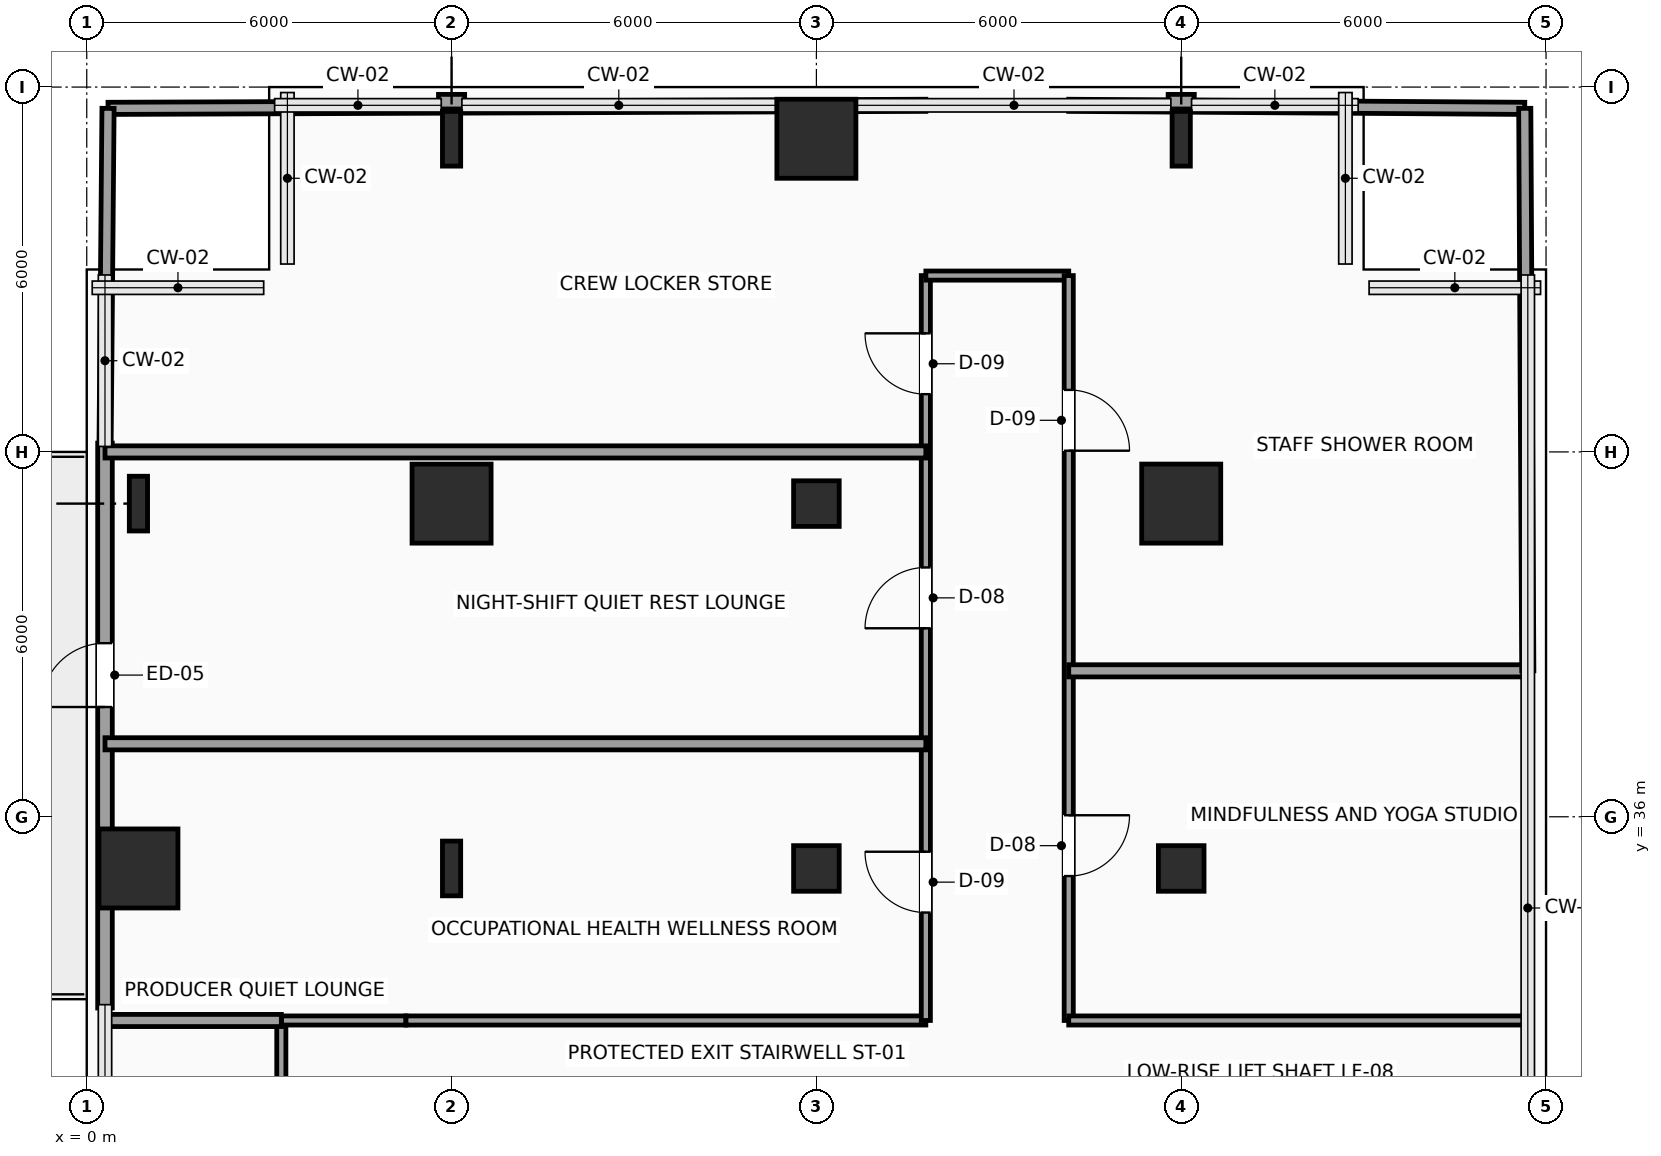
"""IFC4 building model, lengths in metres.
Left out: names, types, materials, properties, quantities, classifications, styles, units other than length and angle.
Written with IfcOpenShell. Run it as: python <this file> out.ifc"""

import sys

from ifc_helpers import new_model, si_unit, direction, frame, frame_2d, origin, origin_2d, place, context, subcontext, project, spatial, rectangle, hollow_rectangle, i_section, extrude, element, fill, save


model = new_model("IFC4")
c1 = context("Model", 3, precision=1e-05, world=origin(), true_north=direction((0.0, 1.0)))
c2 = subcontext(c1, "Body", "Model", "MODEL_VIEW")
j1 = project(units=[si_unit("LENGTHUNIT", "METRE"), si_unit("PLANEANGLEUNIT", "RADIAN")], contexts=[c1])
p1 = place(None, origin())
s1 = spatial("IfcSite", under=j1, at=p1, CompositionType="ELEMENT")
p2 = place(p1, origin())
s2 = spatial("IfcBuilding", under=s1, at=p2, CompositionType="ELEMENT")
p3 = place(p2, frame((0.0, 0.0, 71.4)))
s3 = spatial("IfcBuildingStorey", under=s2, at=p3, CompositionType="ELEMENT", Elevation=71.4)
p4 = place(p3, frame((0.85, 35.15, 0.0), z_axis=(0.0, 0.0, 1.0), x_axis=(1.0, 0.0, 0.0)))
e1 = element("IfcColumn", 1, at=p4, inside=s3, PredefinedType="COLUMN", context=c2, shape_type="SweptSolid", body=[
    extrude(rectangle(XDim=1.3, YDim=1.3, at=origin_2d()), origin(), (0.0, 0.0, 1.0), 3.9),
])
for number, where, z_axis, x_axis in (
    (2, (0.85, 41.15, 0.0), (0.0, 0.0, 1.0), (1.0, 0.0, 0.0)),
    (3, (6.0, 35.15, 0.0), (0.0, 0.0, 1.0), (1.0, 0.0, 0.0)),
):
    element("IfcColumn", number, at=place(p3, frame(where, z_axis=z_axis, x_axis=x_axis)), inside=s3, PredefinedType="COLUMN", context=c2, shape_type="SweptSolid", body=[
        extrude(i_section(OverallWidth=0.3, OverallDepth=0.9, WebThickness=0.019, FlangeThickness=0.035, FilletRadius=0.03, at=origin_2d()), origin(), (0.0, 0.0, 1.0), 3.9),
    ])
p5 = place(p3, frame((6.0, 41.15, 0.0), z_axis=(0.0, 0.0, 1.0), x_axis=(1.0, 0.0, 0.0)))
e4 = element("IfcColumn", 4, at=p5, inside=s3, PredefinedType="COLUMN", context=c2, shape_type="SweptSolid", body=[
    extrude(rectangle(XDim=1.3, YDim=1.3, at=origin_2d()), origin(), (0.0, 0.0, 1.0), 3.9),
])
p6 = place(p3, frame((6.0, 47.15, 0.0), z_axis=(0.0, 0.0, 1.0), x_axis=(1.0, 0.0, 0.0)))
e5 = element("IfcColumn", 5, at=p6, inside=s3, PredefinedType="COLUMN", context=c2, shape_type="SweptSolid", body=[
    extrude(i_section(OverallWidth=0.3, OverallDepth=0.9, WebThickness=0.019, FlangeThickness=0.035, FilletRadius=0.03, at=origin_2d()), origin(), (0.0, 0.0, 1.0), 3.9),
])
for number, where, z_axis, x_axis in (
    (6, (12.0, 35.15, 0.0), (0.0, 0.0, 1.0), (1.0, 0.0, 0.0)),
    (7, (12.0, 41.15, 0.0), (0.0, 0.0, 1.0), (1.0, 0.0, 0.0)),
):
    element("IfcColumn", number, at=place(p3, frame(where, z_axis=z_axis, x_axis=x_axis)), inside=s3, PredefinedType="COLUMN", context=c2, shape_type="SweptSolid", body=[
        extrude(hollow_rectangle(XDim=0.75, YDim=0.75, WallThickness=0.035, InnerFilletRadius=0.035, OuterFilletRadius=0.05, at=origin_2d()), origin(), (0.0, 0.0, 1.0), 3.9),
    ])
p7 = place(p3, frame((12.0, 47.15, 0.0), z_axis=(0.0, 0.0, 1.0), x_axis=(1.0, 0.0, 0.0)))
e8 = element("IfcColumn", 8, at=p7, inside=s3, PredefinedType="COLUMN", context=c2, shape_type="SweptSolid", body=[
    extrude(rectangle(XDim=1.3, YDim=1.3, at=origin_2d()), origin(), (0.0, 0.0, 1.0), 3.9),
])
p8 = place(p3, frame((18.0, 35.15, 0.0), z_axis=(0.0, 0.0, 1.0), x_axis=(1.0, 0.0, 0.0)))
e9 = element("IfcColumn", 9, at=p8, inside=s3, PredefinedType="COLUMN", context=c2, shape_type="SweptSolid", body=[
    extrude(hollow_rectangle(XDim=0.75, YDim=0.75, WallThickness=0.035, InnerFilletRadius=0.035, OuterFilletRadius=0.05, at=origin_2d()), origin(), (0.0, 0.0, 1.0), 3.9),
])
p9 = place(p3, frame((18.0, 41.15, 0.0), z_axis=(0.0, 0.0, 1.0), x_axis=(1.0, 0.0, 0.0)))
e10 = element("IfcColumn", 10, at=p9, inside=s3, PredefinedType="COLUMN", context=c2, shape_type="SweptSolid", body=[
    extrude(rectangle(XDim=1.3, YDim=1.3, at=origin_2d()), origin(), (0.0, 0.0, 1.0), 3.9),
])
p10 = place(p3, frame((18.0, 47.15, 0.0), z_axis=(0.0, 0.0, 1.0), x_axis=(1.0, 0.0, 0.0)))
e11 = element("IfcColumn", 11, at=p10, inside=s3, PredefinedType="COLUMN", context=c2, shape_type="SweptSolid", body=[
    extrude(i_section(OverallWidth=0.3, OverallDepth=0.9, WebThickness=0.019, FlangeThickness=0.035, FilletRadius=0.03, at=origin_2d()), origin(), (0.0, 0.0, 1.0), 3.9),
])
p11 = place(p3, frame((0.3, 32.855, 0.0), z_axis=(0.0, 0.0, 1.0), x_axis=(0.0, 1.0, 0.0)))
e12 = element("IfcWall", 12, at=p11, inside=s3, PredefinedType="SOLIDWALL", context=c2, shape_type="SweptSolid", body=[
    extrude(rectangle(XDim=9.29, YDim=0.24, at=frame_2d((4.645, 0.0))), origin(), (0.0, 0.0, 1.0), 3.65),
])
p12 = place(p11, frame((4.95, 0.0, 0.0)))
e13 = element("IfcOpeningElement", 13, at=p12, cuts=e12, PredefinedType="OPENING", context=c2, shape_type="SweptSolid", body=[
    extrude(rectangle(XDim=1.05, YDim=2.2, at=frame_2d((0.525, 1.1))), frame((0.0, 0.13, 0.0), z_axis=(0.0, -1.0, 0.0), x_axis=(1.0, 0.0, 0.0)), (0.0, 0.0, 1.0), 0.26),
])
for number, where, z_axis, x_axis in (
    (14, (5.785, 47.76, 0.0), (0.0, 0.0, 1.0), (1.0, 0.0, 0.0)),
    (15, (17.785, 47.76, 0.0), (0.0, 0.0, 1.0), (1.0, 0.0, 0.0)),
):
    element("IfcWall", number, at=place(p3, frame(where, z_axis=z_axis, x_axis=x_axis)), inside=s3, PredefinedType="SOLIDWALL", context=c2, shape_type="SweptSolid", body=[
        extrude(rectangle(XDim=0.43, YDim=0.24, at=frame_2d((0.215, 0.0))), origin(), (0.0, 0.0, 1.0), 3.65),
    ])
p13 = place(p3, frame((3.2, 30.25, 0.0), z_axis=(0.0, 0.0, 1.0), x_axis=(0.0, 1.0, 0.0)))
e16 = element("IfcWall", 16, at=p13, inside=s3, PredefinedType="PARTITIONING", context=c2, shape_type="SweptSolid", body=[
    extrude(rectangle(XDim=2.4, YDim=0.15, at=frame_2d((1.2, 0.0))), origin(), (0.0, 0.0, 1.0), 3.65),
])
p14 = place(p3, frame((3.2, 32.65, 0.0), z_axis=(0.0, 0.0, 1.0), x_axis=(1.0, 0.0, 0.0)))
e17 = element("IfcWall", 17, at=p14, inside=s3, PredefinedType="PARTITIONING", context=c2, shape_type="SweptSolid", body=[
    extrude(rectangle(XDim=2.05, YDim=0.15, at=frame_2d((1.025, 0.0))), origin(), (0.0, 0.0, 1.0), 3.65),
])
p15 = place(p3, frame((5.25, 32.65, 0.0), z_axis=(0.0, 0.0, 1.0), x_axis=(1.0, 0.0, 0.0)))
e18 = element("IfcWall", 18, at=p15, inside=s3, PredefinedType="PARTITIONING", context=c2, shape_type="SweptSolid", body=[
    extrude(rectangle(XDim=8.55, YDim=0.15, at=frame_2d((4.275, 0.0))), origin(), (0.0, 0.0, 1.0), 3.65),
])
p16 = place(p3, frame((13.8, 32.65, 0.0), z_axis=(0.0, 0.0, 1.0), x_axis=(0.0, 1.0, 0.0)))
e19 = element("IfcWall", 19, at=p16, inside=s3, PredefinedType="PARTITIONING", context=c2, shape_type="SweptSolid", body=[
    extrude(rectangle(XDim=12.25, YDim=0.15, at=frame_2d((6.125, 0.0))), origin(), (0.0, 0.0, 1.0), 3.65),
])
p17 = place(p16, frame((1.775, 0.0, 0.0)))
e20 = element("IfcOpeningElement", 20, at=p17, cuts=e19, PredefinedType="OPENING", context=c2, shape_type="SweptSolid", body=[
    extrude(rectangle(XDim=1.0, YDim=2.2, at=frame_2d((0.5, 1.1))), frame((0.0, 0.085, 0.0), z_axis=(0.0, -1.0, 0.0), x_axis=(1.0, 0.0, 0.0)), (0.0, 0.0, 1.0), 0.17),
])
p18 = place(p16, frame((6.45, 0.0, 0.0)))
e21 = element("IfcOpeningElement", 21, at=p18, cuts=e19, PredefinedType="OPENING", context=c2, shape_type="SweptSolid", body=[
    extrude(rectangle(XDim=1.0, YDim=2.2, at=frame_2d((0.5, 1.1))), frame((0.0, 0.085, 0.0), z_axis=(0.0, -1.0, 0.0), x_axis=(1.0, 0.0, 0.0)), (0.0, 0.0, 1.0), 0.17),
])
p19 = place(p16, frame((10.3, 0.0, 0.0)))
e22 = element("IfcOpeningElement", 22, at=p19, cuts=e19, PredefinedType="OPENING", context=c2, shape_type="SweptSolid", body=[
    extrude(rectangle(XDim=1.0, YDim=2.2, at=frame_2d((0.5, 1.1))), frame((0.0, 0.085, 0.0), z_axis=(0.0, -1.0, 0.0), x_axis=(1.0, 0.0, 0.0)), (0.0, 0.0, 1.0), 0.17),
])
p20 = place(p3, frame((13.8, 44.9, 0.0), z_axis=(0.0, 0.0, 1.0), x_axis=(1.0, 0.0, 0.0)))
e23 = element("IfcWall", 23, at=p20, inside=s3, PredefinedType="PARTITIONING", context=c2, shape_type="SweptSolid", body=[
    extrude(rectangle(XDim=2.35, YDim=0.15, at=frame_2d((1.175, 0.0))), origin(), (0.0, 0.0, 1.0), 3.65),
])
p21 = place(p3, frame((16.15, 44.9, 0.0), z_axis=(0.0, 0.0, 1.0), x_axis=(0.0, -1.0, 0.0)))
e24 = element("IfcWall", 24, at=p21, inside=s3, PredefinedType="PARTITIONING", context=c2, shape_type="SweptSolid", body=[
    extrude(rectangle(XDim=12.25, YDim=0.15, at=frame_2d((6.125, 0.0))), origin(), (0.0, 0.0, 1.0), 3.65),
])
p22 = place(p21, frame((8.875, 0.0, 0.0)))
e25 = element("IfcOpeningElement", 25, at=p22, cuts=e24, PredefinedType="OPENING", context=c2, shape_type="SweptSolid", body=[
    extrude(rectangle(XDim=1.0, YDim=2.2, at=frame_2d((0.5, 1.1))), frame((0.0, 0.085, 0.0), z_axis=(0.0, -1.0, 0.0), x_axis=(1.0, 0.0, 0.0)), (0.0, 0.0, 1.0), 0.17),
])
p23 = place(p21, frame((1.88, 0.0, 0.0)))
e26 = element("IfcOpeningElement", 26, at=p23, cuts=e24, PredefinedType="OPENING", context=c2, shape_type="SweptSolid", body=[
    extrude(rectangle(XDim=1.0, YDim=2.2, at=frame_2d((0.5, 1.1))), frame((0.0, 0.085, 0.0), z_axis=(0.0, -1.0, 0.0), x_axis=(1.0, 0.0, 0.0)), (0.0, 0.0, 1.0), 0.17),
])
p24 = place(p3, frame((16.15, 32.65, 0.0), z_axis=(0.0, 0.0, 1.0), x_axis=(1.0, 0.0, 0.0)))
e27 = element("IfcWall", 27, at=p24, inside=s3, PredefinedType="PARTITIONING", context=c2, shape_type="SweptSolid", body=[
    extrude(rectangle(XDim=7.55, YDim=0.15, at=frame_2d((3.775, 0.0))), origin(), (0.0, 0.0, 1.0), 3.65),
])
for number, where, z_axis, x_axis in (
    (28, (0.3, 37.2, 0.0), (0.0, 0.0, 1.0), (1.0, 0.0, 0.0)),
    (29, (0.3, 42.0, 0.0), (0.0, 0.0, 1.0), (1.0, 0.0, 0.0)),
):
    element("IfcWall", number, at=place(p3, frame(where, z_axis=z_axis, x_axis=x_axis)), inside=s3, PredefinedType="PARTITIONING", context=c2, shape_type="SweptSolid", body=[
        extrude(rectangle(XDim=13.5, YDim=0.2, at=frame_2d((6.75, 0.0))), origin(), (0.0, 0.0, 1.0), 3.65),
    ])
p25 = place(p3, frame((0.35, 47.65, 0.0), z_axis=(0.0, 0.0, 1.0), x_axis=(0.99999304924, 0.003728467862, 0.0)))
e30 = element("IfcWall", 30, at=p25, inside=s3, PredefinedType="PARTITIONING", context=c2, shape_type="SweptSolid", body=[
    extrude(rectangle(XDim=5.435, YDim=0.2, at=frame_2d((2.717, 0.0))), origin(), (0.0, 0.0, 1.0), 3.65),
])
p26 = place(p3, frame((6.215, 47.672, 0.0), z_axis=(0.0, 0.0, 1.0), x_axis=(0.999993149305, 0.003701532515, 0.0)))
e31 = element("IfcWall", 31, at=p26, inside=s3, PredefinedType="PARTITIONING", context=c2, shape_type="SweptSolid", body=[
    extrude(rectangle(XDim=7.585, YDim=0.2, at=frame_2d((3.792, 0.0))), origin(), (0.0, 0.0, 1.0), 3.65),
])
p27 = place(p3, frame((0.301, 42.145, 0.0), z_axis=(0.0, 0.0, 1.0), x_axis=(0.008869617387, 0.99996066417, 0.0)))
e32 = element("IfcWall", 32, at=p27, inside=s3, PredefinedType="PARTITIONING", context=c2, shape_type="SweptSolid", body=[
    extrude(rectangle(XDim=5.505, YDim=0.2, at=frame_2d((2.752, 0.0))), origin(), (0.0, 0.0, 1.0), 3.65),
])
p28 = place(p3, frame((16.15, 38.4, 0.0), z_axis=(0.0, 0.0, 1.0), x_axis=(1.0, 0.0, 0.0)))
e33 = element("IfcWall", 33, at=p28, inside=s3, PredefinedType="PARTITIONING", context=c2, shape_type="SweptSolid", body=[
    extrude(rectangle(XDim=7.55, YDim=0.2, at=frame_2d((3.775, 0.0))), origin(), (0.0, 0.0, 1.0), 3.142),
])
p29 = place(p3, frame((16.15, 47.7, 0.0), z_axis=(0.0, 0.0, 1.0), x_axis=(0.999978417552, -0.006569964219, 0.0)))
e34 = element("IfcWall", 34, at=p29, inside=s3, PredefinedType="PARTITIONING", context=c2, shape_type="SweptSolid", body=[
    extrude(rectangle(XDim=1.635, YDim=0.2, at=frame_2d((0.817, 0.0))), origin(), (0.0, 0.0, 1.0), 3.65),
])
p30 = place(p3, frame((18.215, 47.686, 0.0), z_axis=(0.0, 0.0, 1.0), x_axis=(0.999977600485, -0.006693170229, 0.0)))
e35 = element("IfcWall", 35, at=p30, inside=s3, PredefinedType="PARTITIONING", context=c2, shape_type="SweptSolid", body=[
    extrude(rectangle(XDim=5.435, YDim=0.2, at=frame_2d((2.717, 0.0))), origin(), (0.0, 0.0, 1.0), 3.65),
])
p31 = place(p3, frame((23.7, 38.4, 0.0), z_axis=(0.0, 0.0, 1.0), x_axis=(-0.005410604923, 0.99998536257, 0.0)))
e36 = element("IfcWall", 36, at=p31, inside=s3, PredefinedType="PARTITIONING", context=c2, shape_type="SweptSolid", body=[
    extrude(rectangle(XDim=9.25, YDim=0.2, at=frame_2d((4.625, 0.0))), origin(), (0.0, 0.0, 1.0), 3.65),
])
p32 = place(p3, frame((0.3, 32.65, 0.0), z_axis=(0.0, 0.0, 1.0), x_axis=(1.0, 0.0, 0.0)))
e37 = element("IfcWall", 37, at=p32, inside=s3, PredefinedType="PARTITIONING", context=c2, shape_type="SweptSolid", body=[
    extrude(rectangle(XDim=2.9, YDim=0.2, at=frame_2d((1.45, 0.0))), origin(), (0.0, 0.0, 1.0), 3.65),
])
p33 = place(p12, origin())
e38 = element("IfcDoor", 38, at=p33, inside=s3, OperationType="SINGLE_SWING_LEFT", PredefinedType="DOOR", context=c2, shape_type="SweptSolid", body=[
    extrude(rectangle(XDim=1.05, YDim=2.2, at=frame_2d((0.525, 1.1))), frame((0.0, 0.025, 0.0), z_axis=(0.0, -1.0, 0.0), x_axis=(1.0, 0.0, 0.0)), (0.0, 0.0, 1.0), 0.05),
])
fill(e13, e38)
p34 = place(p17, origin())
e39 = element("IfcDoor", 39, at=p34, inside=s3, OperationType="SINGLE_SWING_RIGHT", PredefinedType="DOOR", context=c2, shape_type="SweptSolid", body=[
    extrude(rectangle(XDim=1.0, YDim=2.2, at=frame_2d((0.5, 1.1))), frame((0.0, 0.025, 0.0), z_axis=(0.0, -1.0, 0.0), x_axis=(1.0, 0.0, 0.0)), (0.0, 0.0, 1.0), 0.05),
])
fill(e20, e39)
p35 = place(p18, origin())
e40 = element("IfcDoor", 40, at=p35, inside=s3, OperationType="SINGLE_SWING_LEFT", PredefinedType="DOOR", context=c2, shape_type="SweptSolid", body=[
    extrude(rectangle(XDim=1.0, YDim=2.2, at=frame_2d((0.5, 1.1))), frame((0.0, 0.025, 0.0), z_axis=(0.0, -1.0, 0.0), x_axis=(1.0, 0.0, 0.0)), (0.0, 0.0, 1.0), 0.05),
])
fill(e21, e40)
p36 = place(p19, origin())
e41 = element("IfcDoor", 41, at=p36, inside=s3, OperationType="SINGLE_SWING_RIGHT", PredefinedType="DOOR", context=c2, shape_type="SweptSolid", body=[
    extrude(rectangle(XDim=1.0, YDim=2.2, at=frame_2d((0.5, 1.1))), frame((0.0, 0.025, 0.0), z_axis=(0.0, -1.0, 0.0), x_axis=(1.0, 0.0, 0.0)), (0.0, 0.0, 1.0), 0.05),
])
fill(e22, e41)
p37 = place(p22, origin())
e42 = element("IfcDoor", 42, at=p37, inside=s3, OperationType="SINGLE_SWING_LEFT", PredefinedType="DOOR", context=c2, shape_type="SweptSolid", body=[
    extrude(rectangle(XDim=1.0, YDim=2.2, at=frame_2d((0.5, 1.1))), frame((0.0, 0.025, 0.0), z_axis=(0.0, -1.0, 0.0), x_axis=(1.0, 0.0, 0.0)), (0.0, 0.0, 1.0), 0.05),
])
fill(e25, e42)
p38 = place(p23, origin())
e43 = element("IfcDoor", 43, at=p38, inside=s3, OperationType="SINGLE_SWING_RIGHT", PredefinedType="DOOR", context=c2, shape_type="SweptSolid", body=[
    extrude(rectangle(XDim=1.0, YDim=2.2, at=frame_2d((0.5, 1.1))), frame((0.0, 0.025, 0.0), z_axis=(0.0, -1.0, 0.0), x_axis=(1.0, 0.0, 0.0)), (0.0, 0.0, 1.0), 0.05),
])
fill(e26, e43)
save(model, sys.argv[1])
